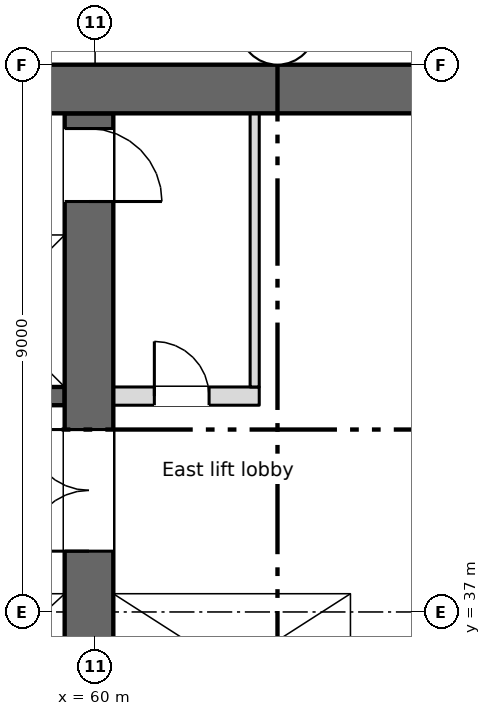
"""IFC4 building model, lengths in metres.
Left out: names, types, materials, properties, quantities, classifications, styles, units other than length and angle.
Written with IfcOpenShell. Run it as: python <this file> out.ifc"""

import sys

from ifc_helpers import new_model, si_unit, direction, frame, frame_2d, origin, place, context, subcontext, project, spatial, rectangle, extrude, element, fill, save


model = new_model("IFC4")
c1 = context("Model", 3, precision=1e-05, world=origin(), true_north=direction((0.0, 1.0)))
c2 = subcontext(c1, "Body", "Model", "MODEL_VIEW")
j1 = project(units=[si_unit("LENGTHUNIT", "METRE"), si_unit("PLANEANGLEUNIT", "RADIAN")], contexts=[c1])
p1 = place(None, origin())
s1 = spatial("IfcSite", under=j1, at=p1, CompositionType="ELEMENT")
p2 = place(p1, origin())
s2 = spatial("IfcBuilding", under=s1, at=p2, CompositionType="ELEMENT")
p3 = place(p2, frame((0.0, 0.0, 98.75)))
s3 = spatial("IfcBuildingStorey", under=s2, at=p3, CompositionType="ELEMENT", Elevation=98.75)
p4 = place(p3, frame((5.55, 45.6, 0.0), z_axis=(0.0, 0.0, 1.0), x_axis=(1.0, 0.0, 0.0)))
e1 = element("IfcWall", 1, at=p4, inside=s3, PredefinedType="SHEAR", context=c2, shape_type="SweptSolid", body=[
    extrude(rectangle(XDim=60.9, YDim=0.8, at=frame_2d((30.45, 0.0))), origin(), (0.0, 0.0, 1.0), 3.35),
])
p5 = place(p4, frame((1.2, 0.0, 0.6)))
e2 = element("IfcOpeningElement", 2, at=p5, cuts=e1, PredefinedType="OPENING", context=c2, shape_type="SweptSolid", body=[
    extrude(rectangle(XDim=0.6, YDim=2.4, at=frame_2d((0.3, 1.2))), frame((0.0, 0.41, 0.0), z_axis=(0.0, -1.0, 0.0), x_axis=(1.0, 0.0, 0.0)), (0.0, 0.0, 1.0), 0.82),
])
p6 = place(p4, frame((7.2, 0.0, 0.6)))
e3 = element("IfcOpeningElement", 3, at=p6, cuts=e1, PredefinedType="OPENING", context=c2, shape_type="SweptSolid", body=[
    extrude(rectangle(XDim=0.6, YDim=2.4, at=frame_2d((0.3, 1.2))), frame((0.0, 0.41, 0.0), z_axis=(0.0, -1.0, 0.0), x_axis=(1.0, 0.0, 0.0)), (0.0, 0.0, 1.0), 0.82),
])
p7 = place(p3, frame((64.35, 34.8, 0.0), z_axis=(0.0, 0.0, 1.0), x_axis=(0.0, 1.0, 0.0)))
e4 = element("IfcWall", 4, at=p7, inside=s3, PredefinedType="SHEAR", context=c2, shape_type="SweptSolid", body=[
    extrude(rectangle(XDim=10.4, YDim=0.3, at=frame_2d((5.2, 0.0))), origin(), (0.0, 0.0, 1.0), 3.35),
])
p8 = place(p3, frame((59.9, 28.4, 0.0), z_axis=(0.0, 0.0, 1.0), x_axis=(0.0, 1.0, 0.0)))
e5 = element("IfcWall", 5, at=p8, inside=s3, PredefinedType="SHEAR", context=c2, shape_type="SweptSolid", body=[
    extrude(rectangle(XDim=16.8, YDim=0.8, at=frame_2d((8.4, 0.0))), origin(), (0.0, 0.0, 1.0), 3.35),
])
p9 = place(p8, frame((9.6, 0.0, 0.0)))
e6 = element("IfcOpeningElement", 6, at=p9, cuts=e5, PredefinedType="OPENING", context=c2, shape_type="SweptSolid", body=[
    extrude(rectangle(XDim=2.0, YDim=2.1, at=frame_2d((1.0, 1.05))), frame((0.0, 0.41, 0.0), z_axis=(0.0, -1.0, 0.0), x_axis=(1.0, 0.0, 0.0)), (0.0, 0.0, 1.0), 0.82),
])
p10 = place(p8, frame((15.35, 0.0, 0.0)))
e7 = element("IfcOpeningElement", 7, at=p10, cuts=e5, PredefinedType="OPENING", context=c2, shape_type="SweptSolid", body=[
    extrude(rectangle(XDim=1.2, YDim=2.1, at=frame_2d((0.6, 1.05))), frame((0.0, 0.41, 0.0), z_axis=(0.0, -1.0, 0.0), x_axis=(1.0, 0.0, 0.0)), (0.0, 0.0, 1.0), 0.82),
])
p11 = place(p3, frame((47.3, 37.45, 0.0), z_axis=(0.0, 0.0, 1.0), x_axis=(1.0, 0.0, 0.0)))
e8 = element("IfcWall", 8, at=p11, inside=s3, PredefinedType="SHEAR", context=c2, shape_type="SweptSolid", body=[
    extrude(rectangle(XDim=12.2, YDim=0.3, at=frame_2d((6.1, 0.0))), origin(), (0.0, 0.0, 1.0), 3.35),
])
p12 = place(p11, frame((4.3, 0.0, 0.0)))
e9 = element("IfcOpeningElement", 9, at=p12, cuts=e8, PredefinedType="OPENING", context=c2, shape_type="SweptSolid", body=[
    extrude(rectangle(XDim=1.1, YDim=2.1, at=frame_2d((0.55, 1.05))), frame((0.0, 0.16, 0.0), z_axis=(0.0, -1.0, 0.0), x_axis=(1.0, 0.0, 0.0)), (0.0, 0.0, 1.0), 0.32),
])
p13 = place(p11, frame((7.3, 0.0, 0.0)))
e10 = element("IfcOpeningElement", 10, at=p13, cuts=e8, PredefinedType="OPENING", context=c2, shape_type="SweptSolid", body=[
    extrude(rectangle(XDim=1.1, YDim=2.1, at=frame_2d((0.55, 1.05))), frame((0.0, 0.16, 0.0), z_axis=(0.0, -1.0, 0.0), x_axis=(1.0, 0.0, 0.0)), (0.0, 0.0, 1.0), 0.32),
])
p14 = place(p11, frame((10.3, 0.0, 0.0)))
e11 = element("IfcOpeningElement", 11, at=p14, cuts=e8, PredefinedType="OPENING", context=c2, shape_type="SweptSolid", body=[
    extrude(rectangle(XDim=1.1, YDim=2.1, at=frame_2d((0.55, 1.05))), frame((0.0, 0.16, 0.0), z_axis=(0.0, -1.0, 0.0), x_axis=(1.0, 0.0, 0.0)), (0.0, 0.0, 1.0), 0.32),
])
p15 = place(p3, frame((60.3, 37.45, 0.0), z_axis=(0.0, 0.0, 1.0), x_axis=(1.0, 0.0, 0.0)))
e12 = element("IfcWall", 12, at=p15, inside=s3, PredefinedType="SHEAR", context=c2, shape_type="SweptSolid", body=[
    extrude(rectangle(XDim=3.9, YDim=0.3, at=frame_2d((1.95, 0.0))), origin(), (0.0, 0.0, 1.0), 3.35),
])
p16 = place(p15, frame((1.4, 0.0, 0.0)))
e13 = element("IfcOpeningElement", 13, at=p16, cuts=e12, PredefinedType="OPENING", context=c2, shape_type="SweptSolid", body=[
    extrude(rectangle(XDim=1.1, YDim=2.1, at=frame_2d((0.55, 1.05))), frame((0.0, 0.16, 0.0), z_axis=(0.0, -1.0, 0.0), x_axis=(1.0, 0.0, 0.0)), (0.0, 0.0, 1.0), 0.32),
])
p17 = place(p3, frame((18.5, 40.55, 0.0), z_axis=(0.0, 0.0, 1.0), x_axis=(1.0, 0.0, 0.0)))
e14 = element("IfcWall", 14, at=p17, inside=s3, PredefinedType="SHEAR", context=c2, shape_type="SweptSolid", body=[
    extrude(rectangle(XDim=41.0, YDim=0.3, at=frame_2d((20.5, 0.0))), origin(), (0.0, 0.0, 1.0), 3.35),
])
p18 = place(p17, frame((18.65, 0.0, 0.0)))
e15 = element("IfcOpeningElement", 15, at=p18, cuts=e14, PredefinedType="OPENING", context=c2, shape_type="SweptSolid", body=[
    extrude(rectangle(XDim=0.9, YDim=2.1, at=frame_2d((0.45, 1.05))), frame((0.0, 0.16, 0.0), z_axis=(0.0, -1.0, 0.0), x_axis=(1.0, 0.0, 0.0)), (0.0, 0.0, 1.0), 0.32),
])
p19 = place(p17, frame((6.175, 0.0, 0.0)))
e16 = element("IfcOpeningElement", 16, at=p19, cuts=e14, PredefinedType="OPENING", context=c2, shape_type="SweptSolid", body=[
    extrude(rectangle(XDim=1.1, YDim=2.1, at=frame_2d((0.55, 1.05))), frame((0.0, 0.16, 0.0), z_axis=(0.0, -1.0, 0.0), x_axis=(1.0, 0.0, 0.0)), (0.0, 0.0, 1.0), 0.32),
])
p20 = place(p17, frame((8.925, 0.0, 0.0)))
e17 = element("IfcOpeningElement", 17, at=p20, cuts=e14, PredefinedType="OPENING", context=c2, shape_type="SweptSolid", body=[
    extrude(rectangle(XDim=1.1, YDim=2.1, at=frame_2d((0.55, 1.05))), frame((0.0, 0.16, 0.0), z_axis=(0.0, -1.0, 0.0), x_axis=(1.0, 0.0, 0.0)), (0.0, 0.0, 1.0), 0.32),
])
p21 = place(p17, frame((11.675, 0.0, 0.0)))
e18 = element("IfcOpeningElement", 18, at=p21, cuts=e14, PredefinedType="OPENING", context=c2, shape_type="SweptSolid", body=[
    extrude(rectangle(XDim=1.1, YDim=2.1, at=frame_2d((0.55, 1.05))), frame((0.0, 0.16, 0.0), z_axis=(0.0, -1.0, 0.0), x_axis=(1.0, 0.0, 0.0)), (0.0, 0.0, 1.0), 0.32),
])
p22 = place(p17, frame((30.925, 0.0, 0.0)))
e19 = element("IfcOpeningElement", 19, at=p22, cuts=e14, PredefinedType="OPENING", context=c2, shape_type="SweptSolid", body=[
    extrude(rectangle(XDim=1.1, YDim=2.1, at=frame_2d((0.55, 1.05))), frame((0.0, 0.16, 0.0), z_axis=(0.0, -1.0, 0.0), x_axis=(1.0, 0.0, 0.0)), (0.0, 0.0, 1.0), 0.32),
])
p23 = place(p17, frame((33.675, 0.0, 0.0)))
e20 = element("IfcOpeningElement", 20, at=p23, cuts=e14, PredefinedType="OPENING", context=c2, shape_type="SweptSolid", body=[
    extrude(rectangle(XDim=1.1, YDim=2.1, at=frame_2d((0.55, 1.05))), frame((0.0, 0.16, 0.0), z_axis=(0.0, -1.0, 0.0), x_axis=(1.0, 0.0, 0.0)), (0.0, 0.0, 1.0), 0.32),
])
p24 = place(p17, frame((36.375, 0.0, 0.0)))
e21 = element("IfcOpeningElement", 21, at=p24, cuts=e14, PredefinedType="OPENING", context=c2, shape_type="SweptSolid", body=[
    extrude(rectangle(XDim=1.2, YDim=2.1, at=frame_2d((0.6, 1.05))), frame((0.0, 0.16, 0.0), z_axis=(0.0, -1.0, 0.0), x_axis=(1.0, 0.0, 0.0)), (0.0, 0.0, 1.0), 0.32),
])
p25 = place(p17, frame((39.15, 0.0, 0.0)))
e22 = element("IfcOpeningElement", 22, at=p25, cuts=e14, PredefinedType="OPENING", context=c2, shape_type="SweptSolid", body=[
    extrude(rectangle(XDim=1.2, YDim=2.1, at=frame_2d((0.6, 1.05))), frame((0.0, 0.16, 0.0), z_axis=(0.0, -1.0, 0.0), x_axis=(1.0, 0.0, 0.0)), (0.0, 0.0, 1.0), 0.32),
])
p26 = place(p3, frame((18.5, 43.35, 0.0), z_axis=(0.0, 0.0, 1.0), x_axis=(1.0, 0.0, 0.0)))
e23 = element("IfcWall", 23, at=p26, inside=s3, PredefinedType="SHEAR", context=c2, shape_type="SweptSolid", body=[
    extrude(rectangle(XDim=41.0, YDim=0.3, at=frame_2d((20.5, 0.0))), origin(), (0.0, 0.0, 1.0), 3.35),
])
p27 = place(p3, frame((60.3, 40.55, 0.0), z_axis=(0.0, 0.0, 1.0), x_axis=(1.0, 0.0, 0.0)))
e24 = element("IfcWall", 24, at=p27, inside=s3, PredefinedType="PARTITIONING", context=c2, shape_type="SweptSolid", body=[
    extrude(rectangle(XDim=2.4, YDim=0.3, at=frame_2d((1.2, 0.0))), origin(), (0.0, 0.0, 1.0), 3.35),
])
p28 = place(p27, frame((0.675, 0.0, 0.0)))
e25 = element("IfcOpeningElement", 25, at=p28, cuts=e24, PredefinedType="OPENING", context=c2, shape_type="SweptSolid", body=[
    extrude(rectangle(XDim=0.9, YDim=2.1, at=frame_2d((0.45, 1.05))), frame((0.0, 0.16, 0.0), z_axis=(0.0, -1.0, 0.0), x_axis=(1.0, 0.0, 0.0)), (0.0, 0.0, 1.0), 0.32),
])
p29 = place(p3, frame((62.625, 40.7, 0.0), z_axis=(0.0, 0.0, 1.0), x_axis=(0.0, 1.0, 0.0)))
e26 = element("IfcWall", 26, at=p29, inside=s3, PredefinedType="PARTITIONING", context=c2, shape_type="SweptSolid", body=[
    extrude(rectangle(XDim=4.5, YDim=0.15, at=frame_2d((2.25, 0.0))), origin(), (0.0, 0.0, 1.0), 3.35),
])
p30 = place(p28, origin())
e27 = element("IfcDoor", 27, at=p30, inside=s3, OperationType="SINGLE_SWING_LEFT", PredefinedType="DOOR", context=c2, shape_type="SweptSolid", body=[
    extrude(rectangle(XDim=0.9, YDim=2.1, at=frame_2d((0.45, 1.05))), frame((0.0, 0.025, 0.0), z_axis=(0.0, -1.0, 0.0), x_axis=(1.0, 0.0, 0.0)), (0.0, 0.0, 1.0), 0.05),
])
fill(e25, e27)
p31 = place(p16, origin())
e28 = element("IfcDoor", 28, at=p31, inside=s3, OperationType="SLIDING_TO_LEFT", PredefinedType="DOOR", context=c2, shape_type="SweptSolid", body=[
    extrude(rectangle(XDim=1.1, YDim=2.1, at=frame_2d((0.55, 1.05))), frame((0.0, 0.025, 0.0), z_axis=(0.0, -1.0, 0.0), x_axis=(1.0, 0.0, 0.0)), (0.0, 0.0, 1.0), 0.05),
])
fill(e13, e28)
p32 = place(p9, origin())
e29 = element("IfcDoor", 29, at=p32, inside=s3, OperationType="DOUBLE_DOOR_SINGLE_SWING", PredefinedType="DOOR", context=c2, shape_type="SweptSolid", body=[
    extrude(rectangle(XDim=2.0, YDim=2.1, at=frame_2d((1.0, 1.05))), frame((0.0, 0.025, 0.0), z_axis=(0.0, -1.0, 0.0), x_axis=(1.0, 0.0, 0.0)), (0.0, 0.0, 1.0), 0.05),
])
fill(e6, e29)
p33 = place(p10, origin())
e30 = element("IfcDoor", 30, at=p33, inside=s3, OperationType="SINGLE_SWING_LEFT", PredefinedType="DOOR", context=c2, shape_type="SweptSolid", body=[
    extrude(rectangle(XDim=1.2, YDim=2.1, at=frame_2d((0.6, 1.05))), frame((0.0, 0.025, 0.0), z_axis=(0.0, -1.0, 0.0), x_axis=(1.0, 0.0, 0.0)), (0.0, 0.0, 1.0), 0.05),
])
fill(e7, e30)
save(model, sys.argv[1])
